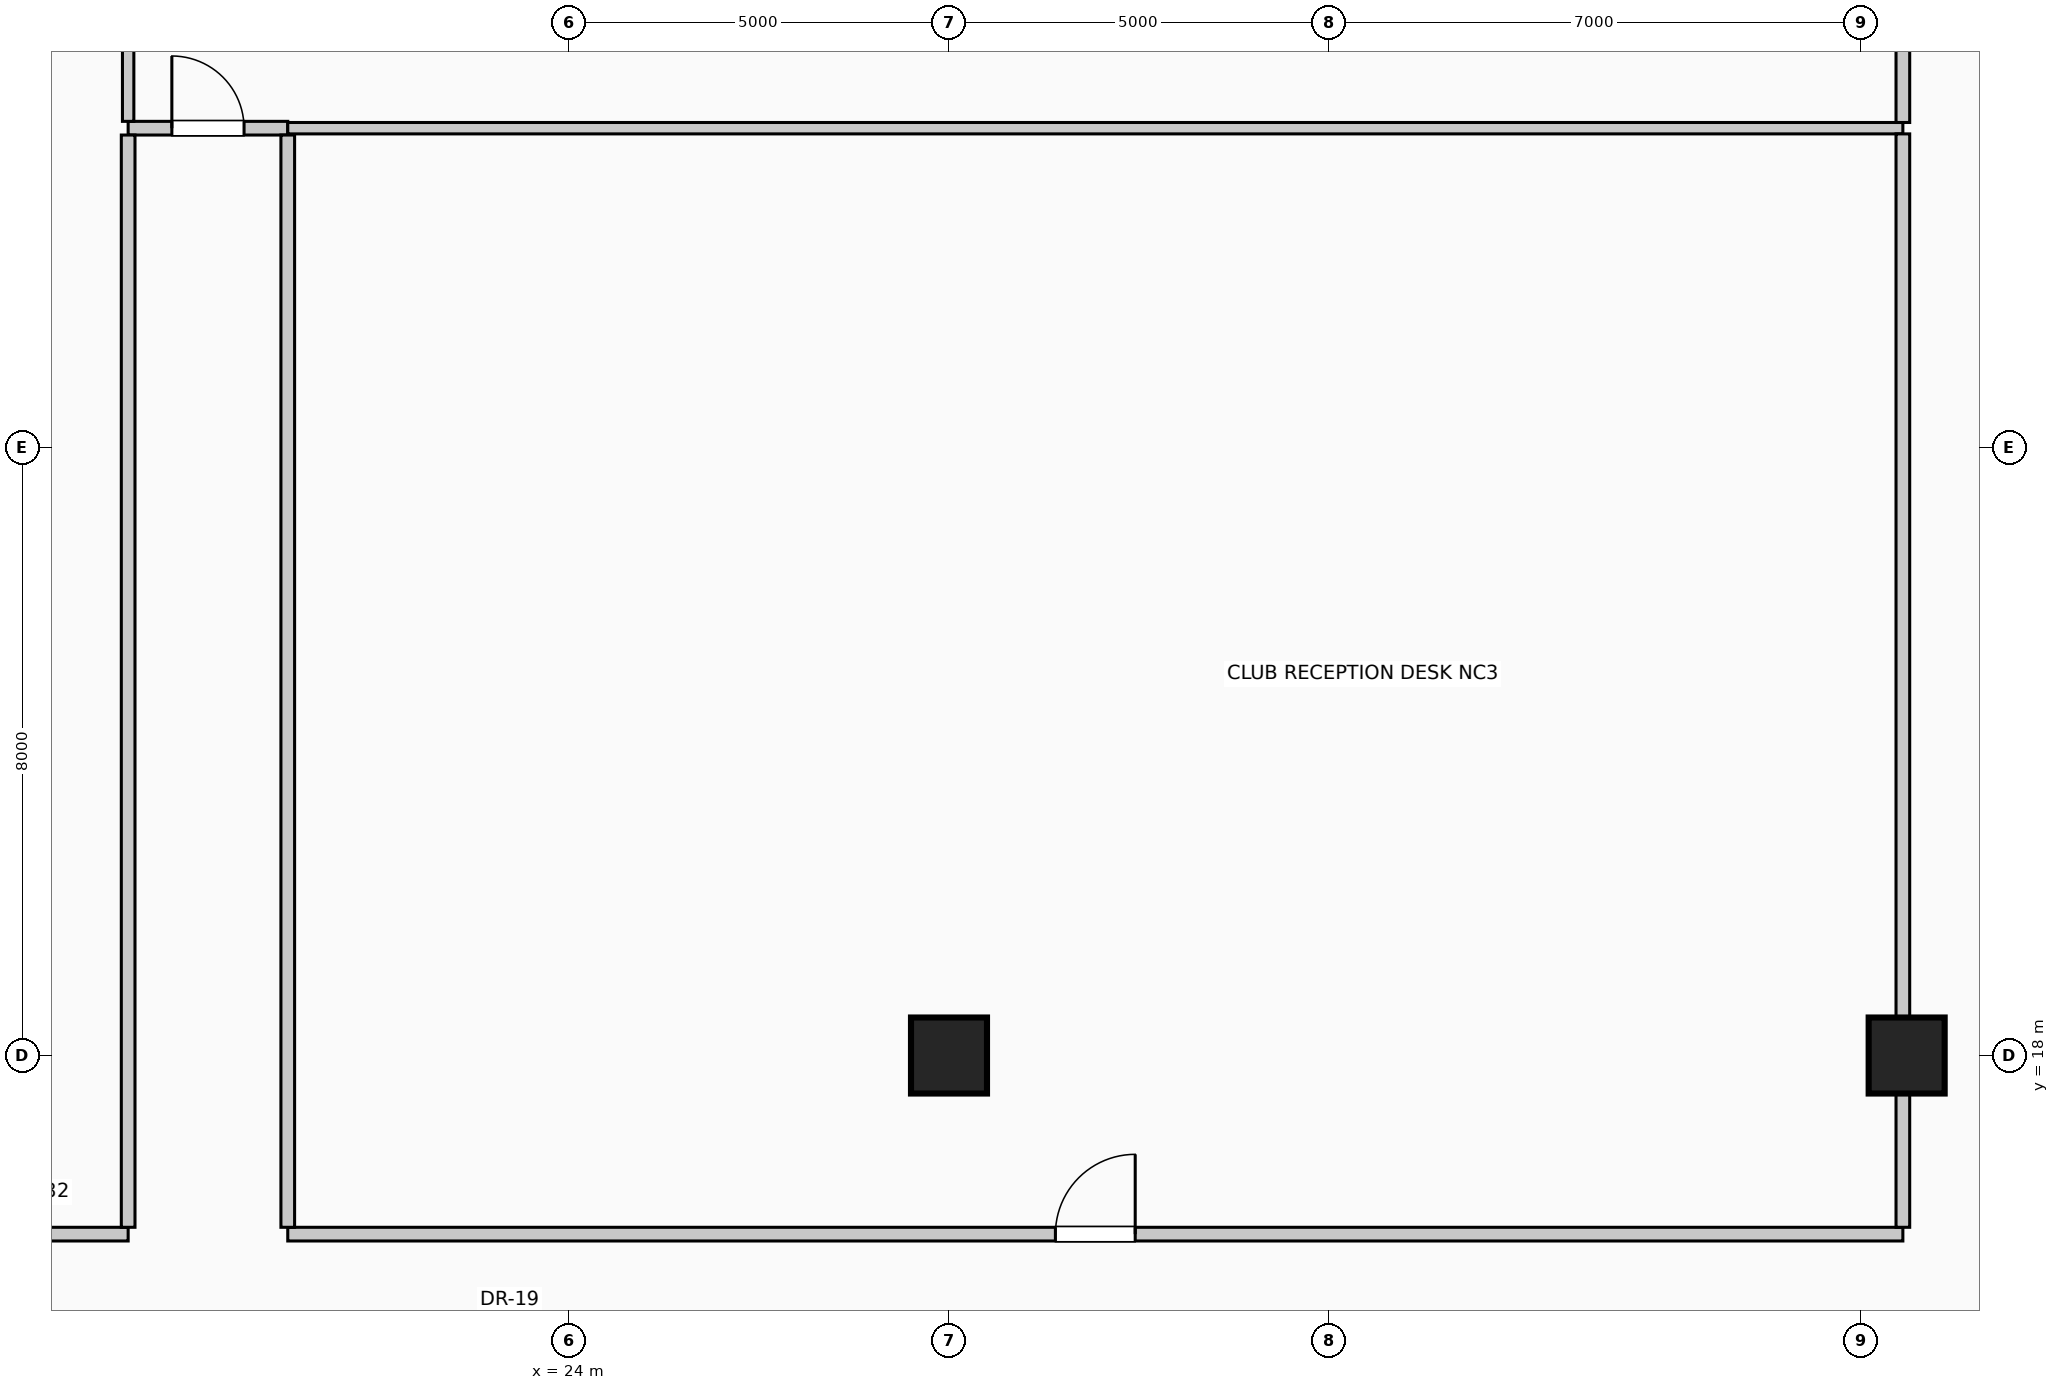
"""IFC4 building model, lengths in metres.
Left out: names, types, materials, properties, quantities, classifications, styles, units other than length and angle.
Written with IfcOpenShell. Run it as: python <this file> out.ifc"""

import sys

from ifc_helpers import new_model, si_unit, direction, frame, frame_2d, origin, origin_2d, place, context, subcontext, project, spatial, rectangle, circle, extrude, element, fill, save


model = new_model("IFC4")
c1 = context("Model", 3, precision=1e-05, world=origin(), true_north=direction((0.0, 1.0)))
c2 = subcontext(c1, "Body", "Model", "MODEL_VIEW")
j1 = project(units=[si_unit("LENGTHUNIT", "METRE"), si_unit("PLANEANGLEUNIT", "RADIAN")], contexts=[c1])
p1 = place(None, origin())
s1 = spatial("IfcSite", under=j1, at=p1, CompositionType="ELEMENT")
p2 = place(p1, origin())
s2 = spatial("IfcBuilding", under=s1, at=p2, CompositionType="ELEMENT")
p3 = place(p2, frame((0.0, 0.0, 100.6)))
s3 = spatial("IfcBuildingStorey", under=s2, at=p3, CompositionType="ELEMENT", Elevation=100.6)
for number, where, z_axis, x_axis in (
    (1, (29.0, 18.0, 0.0), (0.0, 0.0, 1.0), (1.0, 0.0, 0.0)),
    (2, (41.6, 18.0, 0.0), (0.0, 0.0, 1.0), (1.0, 0.0, 0.0)),
):
    element("IfcColumn", number, at=place(p3, frame(where, z_axis=z_axis, x_axis=x_axis)), inside=s3, PredefinedType="COLUMN", context=c2, shape_type="SweptSolid", body=[
        extrude(circle(Radius=0.5, at=origin_2d()), origin(), (0.0, 0.0, 1.0), 4.0),
    ])
p4 = place(p3, frame((15.85, 15.65, 0.0), z_axis=(0.0, 0.0, 1.0), x_axis=(1.0, 0.0, 0.0)))
e3 = element("IfcWall", 3, at=p4, inside=s3, PredefinedType="PARTITIONING", context=c2, shape_type="SweptSolid", body=[
    extrude(rectangle(XDim=2.35, YDim=0.18, at=frame_2d((1.175, 0.0))), origin(), (0.0, 0.0, 1.0), 3.725),
])
p5 = place(p3, frame((20.3, 15.65, 0.0), z_axis=(0.0, 0.0, 1.0), x_axis=(1.0, 0.0, 0.0)))
e4 = element("IfcWall", 4, at=p5, inside=s3, PredefinedType="PARTITIONING", context=c2, shape_type="SweptSolid", body=[
    extrude(rectangle(XDim=21.25, YDim=0.18, at=frame_2d((10.625, 0.0))), origin(), (0.0, 0.0, 1.0), 3.725),
])
p6 = place(p5, frame((10.1, 0.0, 0.0)))
e5 = element("IfcOpeningElement", 5, at=p6, cuts=e4, PredefinedType="OPENING", context=c2, shape_type="SweptSolid", body=[
    extrude(rectangle(XDim=1.05, YDim=2.15, at=frame_2d((0.525, 1.075))), frame((0.0, 0.1, 0.0), z_axis=(0.0, -1.0, 0.0), x_axis=(1.0, 0.0, 0.0)), (0.0, 0.0, 1.0), 0.2),
])
p7 = place(p3, frame((18.2, 30.2, 0.0), z_axis=(0.0, 0.0, 1.0), x_axis=(1.0, 0.0, 0.0)))
e6 = element("IfcWall", 6, at=p7, inside=s3, PredefinedType="PARTITIONING", context=c2, shape_type="SweptSolid", body=[
    extrude(rectangle(XDim=2.1, YDim=0.18, at=frame_2d((1.05, 0.0))), origin(), (0.0, 0.0, 1.0), 3.725),
])
p8 = place(p7, frame((0.575, 0.0, 0.0)))
e7 = element("IfcOpeningElement", 7, at=p8, cuts=e6, PredefinedType="OPENING", context=c2, shape_type="SweptSolid", body=[
    extrude(rectangle(XDim=0.95, YDim=2.15, at=frame_2d((0.475, 1.075))), frame((0.0, 0.1, 0.0), z_axis=(0.0, -1.0, 0.0), x_axis=(1.0, 0.0, 0.0)), (0.0, 0.0, 1.0), 0.2),
])
p9 = place(p3, frame((20.3, 30.2, 0.0), z_axis=(0.0, 0.0, 1.0), x_axis=(1.0, 0.0, 0.0)))
e8 = element("IfcWall", 8, at=p9, inside=s3, PredefinedType="PARTITIONING", context=c2, shape_type="SweptSolid", body=[
    extrude(rectangle(XDim=21.25, YDim=0.15, at=frame_2d((10.625, 0.0))), origin(), (0.0, 0.0, 1.0), 3.725),
])
p10 = place(p3, frame((18.2, 15.74, 0.0), z_axis=(0.0, 0.0, 1.0), x_axis=(0.0, 1.0, 0.0)))
e9 = element("IfcWall", 9, at=p10, inside=s3, PredefinedType="PARTITIONING", context=c2, shape_type="SweptSolid", body=[
    extrude(rectangle(XDim=14.37, YDim=0.18, at=frame_2d((7.185, 0.0))), origin(), (0.0, 0.0, 1.0), 3.725),
])
p11 = place(p3, frame((18.2, 30.29, 0.0), z_axis=(0.0, 0.0, 1.0), x_axis=(0.0, 1.0, 0.0)))
e10 = element("IfcWall", 10, at=p11, inside=s3, PredefinedType="PARTITIONING", context=c2, shape_type="SweptSolid", body=[
    extrude(rectangle(XDim=14.97, YDim=0.15, at=frame_2d((7.485, 0.0))), origin(), (0.0, 0.0, 1.0), 3.725),
])
p12 = place(p3, frame((20.3, 15.74, 0.0), z_axis=(0.0, 0.0, 1.0), x_axis=(0.0, 1.0, 0.0)))
e11 = element("IfcWall", 11, at=p12, inside=s3, PredefinedType="PARTITIONING", context=c2, shape_type="SweptSolid", body=[
    extrude(rectangle(XDim=14.37, YDim=0.18, at=frame_2d((7.185, 0.0))), origin(), (0.0, 0.0, 1.0), 3.725),
])
p13 = place(p3, frame((41.55, 15.74, 0.0), z_axis=(0.0, 0.0, 1.0), x_axis=(0.0, 1.0, 0.0)))
e12 = element("IfcWall", 12, at=p13, inside=s3, PredefinedType="PARTITIONING", context=c2, shape_type="SweptSolid", body=[
    extrude(rectangle(XDim=1.76, YDim=0.18, at=frame_2d((0.88, 0.0))), origin(), (0.0, 0.0, 1.0), 3.07),
])
p14 = place(p3, frame((41.55, 18.5, 0.0), z_axis=(0.0, 0.0, 1.0), x_axis=(0.0, 1.0, 0.0)))
e13 = element("IfcWall", 13, at=p14, inside=s3, PredefinedType="PARTITIONING", context=c2, shape_type="SweptSolid", body=[
    extrude(rectangle(XDim=11.625, YDim=0.18, at=frame_2d((5.812, 0.0))), origin(), (0.0, 0.0, 1.0), 3.07),
])
p15 = place(p3, frame((41.55, 30.275, 0.0), z_axis=(0.0, 0.0, 1.0), x_axis=(0.0, 1.0, 0.0)))
e14 = element("IfcWall", 14, at=p15, inside=s3, PredefinedType="PARTITIONING", context=c2, shape_type="SweptSolid", body=[
    extrude(rectangle(XDim=2.075, YDim=0.18, at=frame_2d((1.038, 0.0))), origin(), (0.0, 0.0, 1.0), 3.07),
])
p16 = place(p6, origin())
e15 = element("IfcDoor", 15, at=p16, inside=s3, OperationType="SINGLE_SWING_RIGHT", PredefinedType="DOOR", context=c2, shape_type="SweptSolid", body=[
    extrude(rectangle(XDim=1.05, YDim=2.15, at=frame_2d((0.525, 1.075))), frame((0.0, 0.025, 0.0), z_axis=(0.0, -1.0, 0.0), x_axis=(1.0, 0.0, 0.0)), (0.0, 0.0, 1.0), 0.05),
])
fill(e5, e15)
p17 = place(p8, origin())
e16 = element("IfcDoor", 16, at=p17, inside=s3, OperationType="SINGLE_SWING_LEFT", PredefinedType="DOOR", context=c2, shape_type="SweptSolid", body=[
    extrude(rectangle(XDim=0.95, YDim=2.15, at=frame_2d((0.475, 1.075))), frame((0.0, 0.025, 0.0), z_axis=(0.0, -1.0, 0.0), x_axis=(1.0, 0.0, 0.0)), (0.0, 0.0, 1.0), 0.05),
])
fill(e7, e16)
save(model, sys.argv[1])
